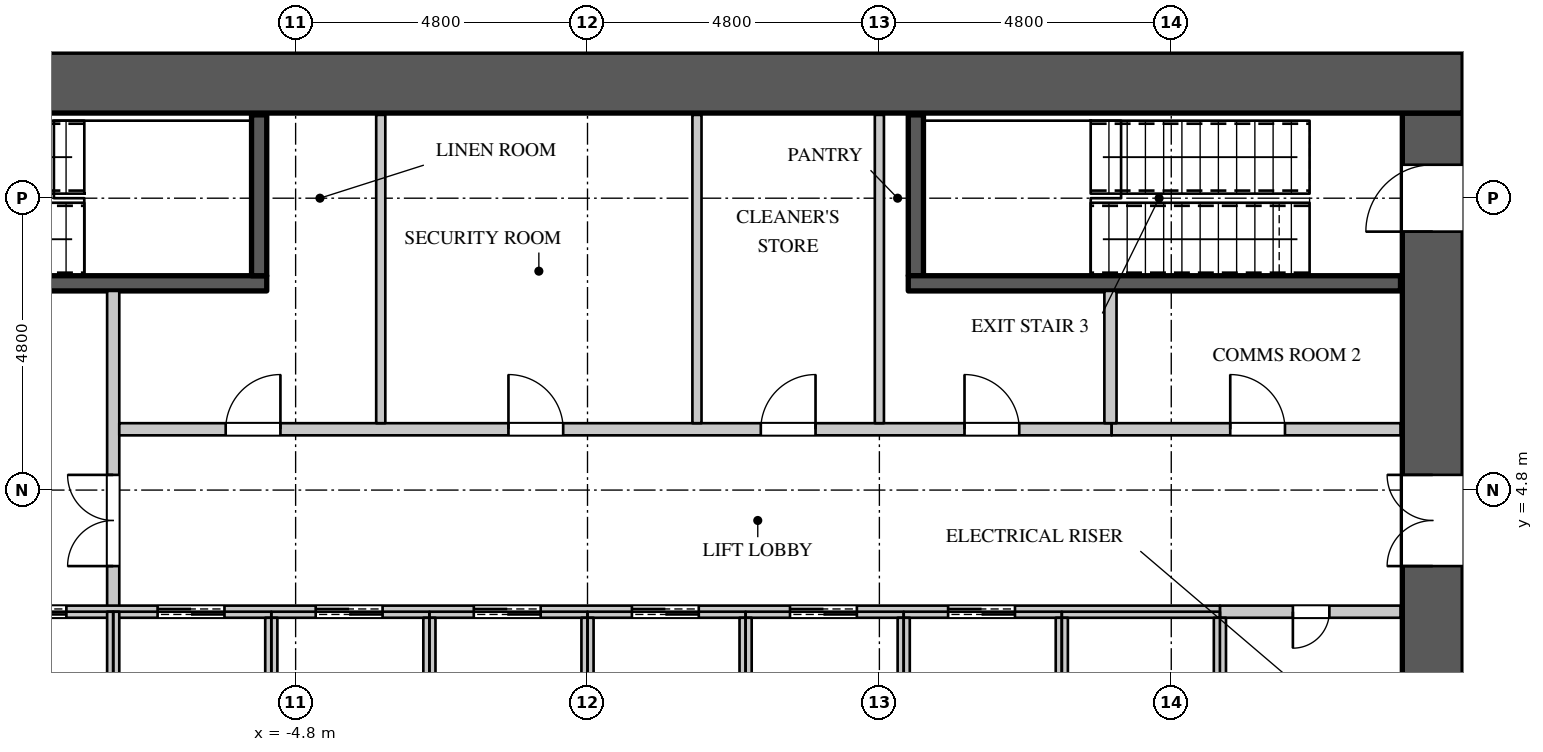
"""IFC4 building model, lengths in metres.
Left out: names, types, materials, properties, quantities, classifications, styles, units other than length and angle.
Written with IfcOpenShell. Run it as: python <this file> out.ifc"""

import sys

from ifc_helpers import new_model, si_unit, direction, frame, frame_2d, origin, place, context, subcontext, project, spatial, rectangle, extrude, element, fill, save


model = new_model("IFC4")
c1 = context("Model", 3, precision=1e-05, world=origin(), true_north=direction((0.0, 1.0)))
c2 = subcontext(c1, "Body", "Model", "MODEL_VIEW")
j1 = project(units=[si_unit("LENGTHUNIT", "METRE"), si_unit("PLANEANGLEUNIT", "RADIAN")], contexts=[c1])
p1 = place(None, origin())
s1 = spatial("IfcSite", under=j1, at=p1, CompositionType="ELEMENT")
p2 = place(p1, origin())
s2 = spatial("IfcBuilding", under=s1, at=p2, CompositionType="ELEMENT")
p3 = place(p2, frame((0.0, 0.0, 38.1)))
s3 = spatial("IfcBuildingStorey", under=s2, at=p3, CompositionType="ELEMENT", Elevation=38.1)
p4 = place(p3, frame((-14.4, 11.5, 0.0), z_axis=(0.0, 0.0, 1.0), x_axis=(1.0, 0.0, 0.0)))
e1 = element("IfcWall", 1, at=p4, inside=s3, PredefinedType="SHEAR", context=c2, shape_type="SweptSolid", body=[
    extrude(rectangle(XDim=28.8, YDim=1.0, at=frame_2d((14.4, 0.0))), origin(), (0.0, 0.0, 1.0), 4.2),
])
p5 = place(p3, frame((13.9, -11.0, 0.0), z_axis=(0.0, 0.0, 1.0), x_axis=(0.0, 1.0, 0.0)))
e2 = element("IfcWall", 2, at=p5, inside=s3, PredefinedType="SHEAR", context=c2, shape_type="SweptSolid", body=[
    extrude(rectangle(XDim=22.0, YDim=1.0, at=frame_2d((11.0, 0.0))), origin(), (0.0, 0.0, 1.0), 4.2),
])
p6 = place(p5, frame((20.05, 0.0, 0.0)))
e3 = element("IfcOpeningElement", 3, at=p6, cuts=e2, PredefinedType="OPENING", context=c2, shape_type="SweptSolid", body=[
    extrude(rectangle(XDim=1.1, YDim=2.2, at=frame_2d((0.55, 1.1))), frame((0.0, 0.51, 0.0), z_axis=(0.0, -1.0, 0.0), x_axis=(1.0, 0.0, 0.0)), (0.0, 0.0, 1.0), 1.02),
])
p7 = place(p5, frame((0.85, 0.0, 0.0)))
e4 = element("IfcOpeningElement", 4, at=p7, cuts=e2, PredefinedType="OPENING", context=c2, shape_type="SweptSolid", body=[
    extrude(rectangle(XDim=1.1, YDim=2.2, at=frame_2d((0.55, 1.1))), frame((0.0, 0.51, 0.0), z_axis=(0.0, -1.0, 0.0), x_axis=(1.0, 0.0, 0.0)), (0.0, 0.0, 1.0), 1.02),
])
p8 = place(p5, frame((14.55, 0.0, 0.0)))
e5 = element("IfcOpeningElement", 5, at=p8, cuts=e2, PredefinedType="OPENING", context=c2, shape_type="SweptSolid", body=[
    extrude(rectangle(XDim=1.5, YDim=2.4, at=frame_2d((0.75, 1.2))), frame((0.0, 0.51, 0.0), z_axis=(0.0, -1.0, 0.0), x_axis=(1.0, 0.0, 0.0)), (0.0, 0.0, 1.0), 1.02),
])
p9 = place(p5, frame((5.95, 0.0, 0.0)))
e6 = element("IfcOpeningElement", 6, at=p9, cuts=e2, PredefinedType="OPENING", context=c2, shape_type="SweptSolid", body=[
    extrude(rectangle(XDim=1.5, YDim=2.4, at=frame_2d((0.75, 1.2))), frame((0.0, 0.51, 0.0), z_axis=(0.0, -1.0, 0.0), x_axis=(1.0, 0.0, 0.0)), (0.0, 0.0, 1.0), 1.02),
])
p10 = place(p3, frame((-7.8, 2.8, 0.0), z_axis=(0.0, 0.0, 1.0), x_axis=(0.0, 1.0, 0.0)))
e7 = element("IfcWall", 7, at=p10, inside=s3, PredefinedType="PARTITIONING", context=c2, shape_type="SweptSolid", body=[
    extrude(rectangle(XDim=5.275, YDim=0.2, at=frame_2d((2.637, 0.0))), origin(), (0.0, 0.0, 1.0), 3.95),
])
p11 = place(p10, frame((0.75, 0.0, 0.0)))
e8 = element("IfcOpeningElement", 8, at=p11, cuts=e7, PredefinedType="OPENING", context=c2, shape_type="SweptSolid", body=[
    extrude(rectangle(XDim=1.5, YDim=2.4, at=frame_2d((0.75, 1.2))), frame((0.0, 0.11, 0.0), z_axis=(0.0, -1.0, 0.0), x_axis=(1.0, 0.0, 0.0)), (0.0, 0.0, 1.0), 0.22),
])
p12 = place(p3, frame((-7.7, 5.8, 0.0), z_axis=(0.0, 0.0, 1.0), x_axis=(1.0, 0.0, 0.0)))
e9 = element("IfcWall", 9, at=p12, inside=s3, PredefinedType="PARTITIONING", context=c2, shape_type="SweptSolid", body=[
    extrude(rectangle(XDim=16.32, YDim=0.2, at=frame_2d((8.16, 0.0))), origin(), (0.0, 0.0, 1.0), 3.95),
])
p13 = place(p12, frame((1.75, 0.0, 0.0)))
e10 = element("IfcOpeningElement", 10, at=p13, cuts=e9, PredefinedType="OPENING", context=c2, shape_type="SweptSolid", body=[
    extrude(rectangle(XDim=0.9, YDim=2.2, at=frame_2d((0.45, 1.1))), frame((0.0, 0.11, 0.0), z_axis=(0.0, -1.0, 0.0), x_axis=(1.0, 0.0, 0.0)), (0.0, 0.0, 1.0), 0.22),
])
p14 = place(p12, frame((6.4, 0.0, 0.0)))
e11 = element("IfcOpeningElement", 11, at=p14, cuts=e9, PredefinedType="OPENING", context=c2, shape_type="SweptSolid", body=[
    extrude(rectangle(XDim=0.9, YDim=2.2, at=frame_2d((0.45, 1.1))), frame((0.0, 0.11, 0.0), z_axis=(0.0, -1.0, 0.0), x_axis=(1.0, 0.0, 0.0)), (0.0, 0.0, 1.0), 0.22),
])
p15 = place(p12, frame((10.55, 0.0, 0.0)))
e12 = element("IfcOpeningElement", 12, at=p15, cuts=e9, PredefinedType="OPENING", context=c2, shape_type="SweptSolid", body=[
    extrude(rectangle(XDim=0.9, YDim=2.2, at=frame_2d((0.45, 1.1))), frame((0.0, 0.11, 0.0), z_axis=(0.0, -1.0, 0.0), x_axis=(1.0, 0.0, 0.0)), (0.0, 0.0, 1.0), 0.22),
])
p16 = place(p12, frame((13.9, 0.0, 0.0)))
e13 = element("IfcOpeningElement", 13, at=p16, cuts=e9, PredefinedType="OPENING", context=c2, shape_type="SweptSolid", body=[
    extrude(rectangle(XDim=0.9, YDim=2.2, at=frame_2d((0.45, 1.1))), frame((0.0, 0.11, 0.0), z_axis=(0.0, -1.0, 0.0), x_axis=(1.0, 0.0, 0.0)), (0.0, 0.0, 1.0), 0.22),
])
for number, where, z_axis, x_axis in (
    (14, (-3.4, 5.9, 0.0), (0.0, 0.0, 1.0), (0.0, 1.0, 0.0)),
    (15, (1.8, 5.9, 0.0), (0.0, 0.0, 1.0), (0.0, 1.0, 0.0)),
    (16, (4.8, 5.9, 0.0), (0.0, 0.0, 1.0), (0.0, 1.0, 0.0)),
):
    element("IfcWall", number, at=place(p3, frame(where, z_axis=z_axis, x_axis=x_axis)), inside=s3, PredefinedType="PARTITIONING", context=c2, shape_type="SweptSolid", body=[
        extrude(rectangle(XDim=5.07, YDim=0.15, at=frame_2d((2.535, 0.0))), origin(), (0.0, 0.0, 1.0), 3.95),
    ])
p17 = place(p3, frame((8.62, 5.8, 0.0), z_axis=(0.0, 0.0, 1.0), x_axis=(1.0, 0.0, 0.0)))
e17 = element("IfcWall", 17, at=p17, inside=s3, PredefinedType="PARTITIONING", context=c2, shape_type="SweptSolid", body=[
    extrude(rectangle(XDim=4.75, YDim=0.2, at=frame_2d((2.375, 0.0))), origin(), (0.0, 0.0, 1.0), 3.95),
])
p18 = place(p17, frame((1.95, 0.0, 0.0)))
e18 = element("IfcOpeningElement", 18, at=p18, cuts=e17, PredefinedType="OPENING", context=c2, shape_type="SweptSolid", body=[
    extrude(rectangle(XDim=0.9, YDim=2.2, at=frame_2d((0.45, 1.1))), frame((0.0, 0.11, 0.0), z_axis=(0.0, -1.0, 0.0), x_axis=(1.0, 0.0, 0.0)), (0.0, 0.0, 1.0), 0.22),
])
p19 = place(p3, frame((8.6, 5.9, 0.0), z_axis=(0.0, 0.0, 1.0), x_axis=(0.0, 1.0, 0.0)))
e19 = element("IfcWall", 19, at=p19, inside=s3, PredefinedType="PARTITIONING", context=c2, shape_type="SweptSolid", body=[
    extrude(rectangle(XDim=2.175, YDim=0.2, at=frame_2d((1.087, 0.0))), origin(), (0.0, 0.0, 1.0), 3.95),
])
p20 = place(p3, frame((10.4, 2.8, 0.0), z_axis=(0.0, 0.0, 1.0), x_axis=(1.0, 0.0, 0.0)))
e20 = element("IfcWall", 20, at=p20, inside=s3, PredefinedType="PARTITIONING", context=c2, shape_type="SweptSolid", body=[
    extrude(rectangle(XDim=2.97, YDim=0.2, at=frame_2d((1.485, 0.0))), origin(), (0.0, 0.0, 1.0), 3.95),
])
p21 = place(p20, frame((1.2, 0.0, 0.0)))
e21 = element("IfcOpeningElement", 21, at=p21, cuts=e20, PredefinedType="OPENING", context=c2, shape_type="SweptSolid", body=[
    extrude(rectangle(XDim=0.6, YDim=2.0, at=frame_2d((0.3, 1.0))), frame((0.0, 0.11, 0.0), z_axis=(0.0, -1.0, 0.0), x_axis=(1.0, 0.0, 0.0)), (0.0, 0.0, 1.0), 0.22),
])
p22 = place(p3, frame((-13.37, 2.8, 0.0), z_axis=(0.0, 0.0, 1.0), x_axis=(1.0, 0.0, 0.0)))
e22 = element("IfcWall", 22, at=p22, inside=s3, PredefinedType="PARTITIONING", context=c2, shape_type="SweptSolid", body=[
    extrude(rectangle(XDim=23.77, YDim=0.2, at=frame_2d((11.885, 0.0))), origin(), (0.0, 0.0, 1.0), 3.95),
])
p23 = place(p22, frame((0.9, 0.0, 0.0)))
e23 = element("IfcOpeningElement", 23, at=p23, cuts=e22, PredefinedType="OPENING", context=c2, shape_type="SweptSolid", body=[
    extrude(rectangle(XDim=1.1, YDim=2.2, at=frame_2d((0.55, 1.1))), frame((0.0, 0.11, 0.0), z_axis=(0.0, -1.0, 0.0), x_axis=(1.0, 0.0, 0.0)), (0.0, 0.0, 1.0), 0.22),
])
p24 = place(p22, frame((3.7, 0.0, 0.0)))
e24 = element("IfcOpeningElement", 24, at=p24, cuts=e22, PredefinedType="OPENING", context=c2, shape_type="SweptSolid", body=[
    extrude(rectangle(XDim=1.1, YDim=2.2, at=frame_2d((0.55, 1.1))), frame((0.0, 0.11, 0.0), z_axis=(0.0, -1.0, 0.0), x_axis=(1.0, 0.0, 0.0)), (0.0, 0.0, 1.0), 0.22),
])
p25 = place(p22, frame((6.3, 0.0, 0.0)))
e25 = element("IfcOpeningElement", 25, at=p25, cuts=e22, PredefinedType="OPENING", context=c2, shape_type="SweptSolid", body=[
    extrude(rectangle(XDim=1.1, YDim=2.2, at=frame_2d((0.55, 1.1))), frame((0.0, 0.11, 0.0), z_axis=(0.0, -1.0, 0.0), x_axis=(1.0, 0.0, 0.0)), (0.0, 0.0, 1.0), 0.22),
])
p26 = place(p22, frame((8.9, 0.0, 0.0)))
e26 = element("IfcOpeningElement", 26, at=p26, cuts=e22, PredefinedType="OPENING", context=c2, shape_type="SweptSolid", body=[
    extrude(rectangle(XDim=1.1, YDim=2.2, at=frame_2d((0.55, 1.1))), frame((0.0, 0.11, 0.0), z_axis=(0.0, -1.0, 0.0), x_axis=(1.0, 0.0, 0.0)), (0.0, 0.0, 1.0), 0.22),
])
p27 = place(p22, frame((11.5, 0.0, 0.0)))
e27 = element("IfcOpeningElement", 27, at=p27, cuts=e22, PredefinedType="OPENING", context=c2, shape_type="SweptSolid", body=[
    extrude(rectangle(XDim=1.1, YDim=2.2, at=frame_2d((0.55, 1.1))), frame((0.0, 0.11, 0.0), z_axis=(0.0, -1.0, 0.0), x_axis=(1.0, 0.0, 0.0)), (0.0, 0.0, 1.0), 0.22),
])
p28 = place(p22, frame((14.1, 0.0, 0.0)))
e28 = element("IfcOpeningElement", 28, at=p28, cuts=e22, PredefinedType="OPENING", context=c2, shape_type="SweptSolid", body=[
    extrude(rectangle(XDim=1.1, YDim=2.2, at=frame_2d((0.55, 1.1))), frame((0.0, 0.11, 0.0), z_axis=(0.0, -1.0, 0.0), x_axis=(1.0, 0.0, 0.0)), (0.0, 0.0, 1.0), 0.22),
])
p29 = place(p22, frame((16.7, 0.0, 0.0)))
e29 = element("IfcOpeningElement", 29, at=p29, cuts=e22, PredefinedType="OPENING", context=c2, shape_type="SweptSolid", body=[
    extrude(rectangle(XDim=1.1, YDim=2.2, at=frame_2d((0.55, 1.1))), frame((0.0, 0.11, 0.0), z_axis=(0.0, -1.0, 0.0), x_axis=(1.0, 0.0, 0.0)), (0.0, 0.0, 1.0), 0.22),
])
p30 = place(p22, frame((19.3, 0.0, 0.0)))
e30 = element("IfcOpeningElement", 30, at=p30, cuts=e22, PredefinedType="OPENING", context=c2, shape_type="SweptSolid", body=[
    extrude(rectangle(XDim=1.1, YDim=2.2, at=frame_2d((0.55, 1.1))), frame((0.0, 0.11, 0.0), z_axis=(0.0, -1.0, 0.0), x_axis=(1.0, 0.0, 0.0)), (0.0, 0.0, 1.0), 0.22),
])
p31 = place(p3, frame((-7.8, 0.0, 0.0), z_axis=(0.0, 0.0, 1.0), x_axis=(0.0, 1.0, 0.0)))
e31 = element("IfcWall", 31, at=p31, inside=s3, PredefinedType="PARTITIONING", context=c2, shape_type="SweptSolid", body=[
    extrude(rectangle(XDim=2.8, YDim=0.2, at=frame_2d((1.4, 0.0))), origin(), (0.0, 0.0, 1.0), 3.95),
])
for number, where, z_axis, x_axis in (
    (32, (-5.2, 0.1, 0.0), (0.0, 0.0, 1.0), (0.0, 1.0, 0.0)),
    (33, (-2.6, 0.1, 0.0), (0.0, 0.0, 1.0), (0.0, 1.0, 0.0)),
    (34, (0.0, 0.1, 0.0), (0.0, 0.0, 1.0), (0.0, 1.0, 0.0)),
    (35, (2.6, 0.1, 0.0), (0.0, 0.0, 1.0), (0.0, 1.0, 0.0)),
    (36, (5.2, 0.1, 0.0), (0.0, 0.0, 1.0), (0.0, 1.0, 0.0)),
):
    element("IfcWall", number, at=place(p3, frame(where, z_axis=z_axis, x_axis=x_axis)), inside=s3, PredefinedType="PARTITIONING", context=c2, shape_type="SweptSolid", body=[
        extrude(rectangle(XDim=2.6, YDim=0.2, at=frame_2d((1.3, 0.0))), origin(), (0.0, 0.0, 1.0), 3.95),
    ])
p32 = place(p3, frame((7.8, 0.0, 0.0), z_axis=(0.0, 0.0, 1.0), x_axis=(0.0, 1.0, 0.0)))
e37 = element("IfcWall", 37, at=p32, inside=s3, PredefinedType="PARTITIONING", context=c2, shape_type="SweptSolid", body=[
    extrude(rectangle(XDim=2.7, YDim=0.2, at=frame_2d((1.35, 0.0))), origin(), (0.0, 0.0, 1.0), 3.95),
])
p33 = place(p3, frame((10.4, -2.7, 0.0), z_axis=(0.0, 0.0, 1.0), x_axis=(0.0, 1.0, 0.0)))
e38 = element("IfcWall", 38, at=p33, inside=s3, PredefinedType="PARTITIONING", context=c2, shape_type="SweptSolid", body=[
    extrude(rectangle(XDim=5.4, YDim=0.2, at=frame_2d((2.7, 0.0))), origin(), (0.0, 0.0, 1.0), 3.95),
])
p34 = place(p3, frame((-13.37, 8.2, 0.0), z_axis=(0.0, 0.0, 1.0), x_axis=(1.0, 0.0, 0.0)))
e39 = element("IfcWall", 39, at=p34, inside=s3, PredefinedType="SHEAR", context=c2, shape_type="SweptSolid", body=[
    extrude(rectangle(XDim=8.095, YDim=0.25, at=frame_2d((4.048, 0.0))), origin(), (0.0, 0.0, 1.0), 3.95),
])
p35 = place(p34, frame((0.15, 0.0, 0.0)))
e40 = element("IfcOpeningElement", 40, at=p35, cuts=e39, PredefinedType="OPENING", context=c2, shape_type="SweptSolid", body=[
    extrude(rectangle(XDim=1.1, YDim=2.2, at=frame_2d((0.55, 1.1))), frame((0.0, 0.135, 0.0), z_axis=(0.0, -1.0, 0.0), x_axis=(1.0, 0.0, 0.0)), (0.0, 0.0, 1.0), 0.27),
])
for number, where, z_axis, x_axis in (
    (41, (-5.4, 8.325, 0.0), (0.0, 0.0, 1.0), (0.0, 1.0, 0.0)),
    (42, (5.4, 8.325, 0.0), (0.0, 0.0, 1.0), (0.0, 1.0, 0.0)),
):
    element("IfcWall", number, at=place(p3, frame(where, z_axis=z_axis, x_axis=x_axis)), inside=s3, PredefinedType="SHEAR", context=c2, shape_type="SweptSolid", body=[
        extrude(rectangle(XDim=2.645, YDim=0.25, at=frame_2d((1.323, 0.0))), origin(), (0.0, 0.0, 1.0), 3.95),
    ])
p36 = place(p3, frame((5.275, 8.2, 0.0), z_axis=(0.0, 0.0, 1.0), x_axis=(1.0, 0.0, 0.0)))
e43 = element("IfcWall", 43, at=p36, inside=s3, PredefinedType="SHEAR", context=c2, shape_type="SweptSolid", body=[
    extrude(rectangle(XDim=8.095, YDim=0.25, at=frame_2d((4.048, 0.0))), origin(), (0.0, 0.0, 1.0), 3.95),
])
p37 = place(p21, origin())
e44 = element("IfcDoor", 44, at=p37, inside=s3, OperationType="SINGLE_SWING_RIGHT", PredefinedType="DOOR", context=c2, shape_type="SweptSolid", body=[
    extrude(rectangle(XDim=0.6, YDim=2.0, at=frame_2d((0.3, 1.0))), frame((0.0, 0.025, 0.0), z_axis=(0.0, -1.0, 0.0), x_axis=(1.0, 0.0, 0.0)), (0.0, 0.0, 1.0), 0.05),
])
fill(e21, e44)
p38 = place(p13, origin())
e45 = element("IfcDoor", 45, at=p38, inside=s3, OperationType="SINGLE_SWING_RIGHT", PredefinedType="DOOR", context=c2, shape_type="SweptSolid", body=[
    extrude(rectangle(XDim=0.9, YDim=2.2, at=frame_2d((0.45, 1.1))), frame((0.0, 0.025, 0.0), z_axis=(0.0, -1.0, 0.0), x_axis=(1.0, 0.0, 0.0)), (0.0, 0.0, 1.0), 0.05),
])
fill(e10, e45)
p39 = place(p14, origin())
e46 = element("IfcDoor", 46, at=p39, inside=s3, OperationType="SINGLE_SWING_LEFT", PredefinedType="DOOR", context=c2, shape_type="SweptSolid", body=[
    extrude(rectangle(XDim=0.9, YDim=2.2, at=frame_2d((0.45, 1.1))), frame((0.0, 0.025, 0.0), z_axis=(0.0, -1.0, 0.0), x_axis=(1.0, 0.0, 0.0)), (0.0, 0.0, 1.0), 0.05),
])
fill(e11, e46)
p40 = place(p15, origin())
e47 = element("IfcDoor", 47, at=p40, inside=s3, OperationType="SINGLE_SWING_RIGHT", PredefinedType="DOOR", context=c2, shape_type="SweptSolid", body=[
    extrude(rectangle(XDim=0.9, YDim=2.2, at=frame_2d((0.45, 1.1))), frame((0.0, 0.025, 0.0), z_axis=(0.0, -1.0, 0.0), x_axis=(1.0, 0.0, 0.0)), (0.0, 0.0, 1.0), 0.05),
])
fill(e12, e47)
p41 = place(p16, origin())
e48 = element("IfcDoor", 48, at=p41, inside=s3, OperationType="SINGLE_SWING_LEFT", PredefinedType="DOOR", context=c2, shape_type="SweptSolid", body=[
    extrude(rectangle(XDim=0.9, YDim=2.2, at=frame_2d((0.45, 1.1))), frame((0.0, 0.025, 0.0), z_axis=(0.0, -1.0, 0.0), x_axis=(1.0, 0.0, 0.0)), (0.0, 0.0, 1.0), 0.05),
])
fill(e13, e48)
p42 = place(p18, origin())
e49 = element("IfcDoor", 49, at=p42, inside=s3, OperationType="SINGLE_SWING_LEFT", PredefinedType="DOOR", context=c2, shape_type="SweptSolid", body=[
    extrude(rectangle(XDim=0.9, YDim=2.2, at=frame_2d((0.45, 1.1))), frame((0.0, 0.025, 0.0), z_axis=(0.0, -1.0, 0.0), x_axis=(1.0, 0.0, 0.0)), (0.0, 0.0, 1.0), 0.05),
])
fill(e18, e49)
p43 = place(p24, origin())
e50 = element("IfcDoor", 50, at=p43, inside=s3, OperationType="DOUBLE_DOOR_SLIDING", PredefinedType="DOOR", context=c2, shape_type="SweptSolid", body=[
    extrude(rectangle(XDim=1.1, YDim=2.2, at=frame_2d((0.55, 1.1))), frame((0.0, 0.025, 0.0), z_axis=(0.0, -1.0, 0.0), x_axis=(1.0, 0.0, 0.0)), (0.0, 0.0, 1.0), 0.05),
])
fill(e24, e50)
p44 = place(p25, origin())
e51 = element("IfcDoor", 51, at=p44, inside=s3, OperationType="DOUBLE_DOOR_SLIDING", PredefinedType="DOOR", context=c2, shape_type="SweptSolid", body=[
    extrude(rectangle(XDim=1.1, YDim=2.2, at=frame_2d((0.55, 1.1))), frame((0.0, 0.025, 0.0), z_axis=(0.0, -1.0, 0.0), x_axis=(1.0, 0.0, 0.0)), (0.0, 0.0, 1.0), 0.05),
])
fill(e25, e51)
p45 = place(p26, origin())
e52 = element("IfcDoor", 52, at=p45, inside=s3, OperationType="DOUBLE_DOOR_SLIDING", PredefinedType="DOOR", context=c2, shape_type="SweptSolid", body=[
    extrude(rectangle(XDim=1.1, YDim=2.2, at=frame_2d((0.55, 1.1))), frame((0.0, 0.025, 0.0), z_axis=(0.0, -1.0, 0.0), x_axis=(1.0, 0.0, 0.0)), (0.0, 0.0, 1.0), 0.05),
])
fill(e26, e52)
p46 = place(p27, origin())
e53 = element("IfcDoor", 53, at=p46, inside=s3, OperationType="DOUBLE_DOOR_SLIDING", PredefinedType="DOOR", context=c2, shape_type="SweptSolid", body=[
    extrude(rectangle(XDim=1.1, YDim=2.2, at=frame_2d((0.55, 1.1))), frame((0.0, 0.025, 0.0), z_axis=(0.0, -1.0, 0.0), x_axis=(1.0, 0.0, 0.0)), (0.0, 0.0, 1.0), 0.05),
])
fill(e27, e53)
p47 = place(p28, origin())
e54 = element("IfcDoor", 54, at=p47, inside=s3, OperationType="DOUBLE_DOOR_SLIDING", PredefinedType="DOOR", context=c2, shape_type="SweptSolid", body=[
    extrude(rectangle(XDim=1.1, YDim=2.2, at=frame_2d((0.55, 1.1))), frame((0.0, 0.025, 0.0), z_axis=(0.0, -1.0, 0.0), x_axis=(1.0, 0.0, 0.0)), (0.0, 0.0, 1.0), 0.05),
])
fill(e28, e54)
p48 = place(p29, origin())
e55 = element("IfcDoor", 55, at=p48, inside=s3, OperationType="DOUBLE_DOOR_SLIDING", PredefinedType="DOOR", context=c2, shape_type="SweptSolid", body=[
    extrude(rectangle(XDim=1.1, YDim=2.2, at=frame_2d((0.55, 1.1))), frame((0.0, 0.025, 0.0), z_axis=(0.0, -1.0, 0.0), x_axis=(1.0, 0.0, 0.0)), (0.0, 0.0, 1.0), 0.05),
])
fill(e29, e55)
p49 = place(p30, origin())
e56 = element("IfcDoor", 56, at=p49, inside=s3, OperationType="DOUBLE_DOOR_SLIDING", PredefinedType="DOOR", context=c2, shape_type="SweptSolid", body=[
    extrude(rectangle(XDim=1.1, YDim=2.2, at=frame_2d((0.55, 1.1))), frame((0.0, 0.025, 0.0), z_axis=(0.0, -1.0, 0.0), x_axis=(1.0, 0.0, 0.0)), (0.0, 0.0, 1.0), 0.05),
])
fill(e30, e56)
p50 = place(p11, origin())
e57 = element("IfcDoor", 57, at=p50, inside=s3, OperationType="DOUBLE_DOOR_SINGLE_SWING", PredefinedType="DOOR", context=c2, shape_type="SweptSolid", body=[
    extrude(rectangle(XDim=1.5, YDim=2.4, at=frame_2d((0.75, 1.2))), frame((0.0, 0.025, 0.0), z_axis=(0.0, -1.0, 0.0), x_axis=(1.0, 0.0, 0.0)), (0.0, 0.0, 1.0), 0.05),
])
fill(e8, e57)
p51 = place(p6, origin())
e58 = element("IfcDoor", 58, at=p51, inside=s3, OperationType="SINGLE_SWING_LEFT", PredefinedType="DOOR", context=c2, shape_type="SweptSolid", body=[
    extrude(rectangle(XDim=1.1, YDim=2.2, at=frame_2d((0.55, 1.1))), frame((0.0, 0.495, 0.0), z_axis=(0.0, -1.0, 0.0), x_axis=(1.0, 0.0, 0.0)), (0.0, 0.0, 1.0), 0.05),
])
fill(e3, e58)
p52 = place(p8, origin())
e59 = element("IfcDoor", 59, at=p52, inside=s3, OperationType="DOUBLE_DOOR_SINGLE_SWING", PredefinedType="DOOR", context=c2, shape_type="SweptSolid", body=[
    extrude(rectangle(XDim=1.5, YDim=2.4, at=frame_2d((0.75, 1.2))), frame((0.0, 0.495, 0.0), z_axis=(0.0, -1.0, 0.0), x_axis=(1.0, 0.0, 0.0)), (0.0, 0.0, 1.0), 0.05),
])
fill(e5, e59)
save(model, sys.argv[1])
